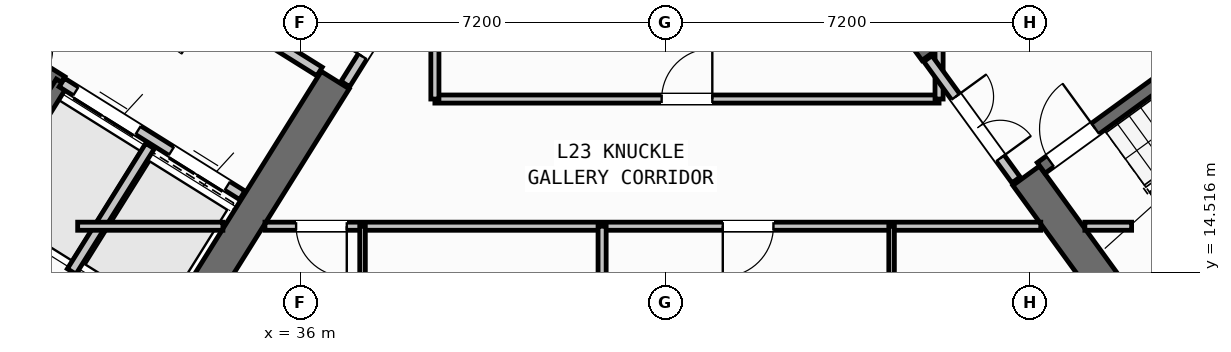
"""IFC4 building model, lengths in metres.
Left out: names, types, materials, properties, quantities, classifications, styles, units other than length and angle.
Written with IfcOpenShell. Run it as: python <this file> out.ifc"""

import sys

from ifc_helpers import new_model, si_unit, direction, frame, frame_2d, origin, place, context, subcontext, project, spatial, rectangle, extrude, source, transform, mapped, element, fill, save


model = new_model("IFC4")
c1 = context("Model", 3, precision=1e-05, world=origin(), true_north=direction((0.0, 1.0)))
c2 = subcontext(c1, "Body", "Model", "MODEL_VIEW")
j1 = project(units=[si_unit("LENGTHUNIT", "METRE"), si_unit("PLANEANGLEUNIT", "RADIAN")], contexts=[c1])
p1 = place(None, origin())
s1 = spatial("IfcSite", under=j1, at=p1, CompositionType="ELEMENT")
p2 = place(p1, origin())
s2 = spatial("IfcBuilding", under=s1, at=p2, CompositionType="ELEMENT")
p3 = place(p2, frame((0.0, 0.0, 93.6)))
s3 = spatial("IfcBuildingStorey", under=s2, at=p3, CompositionType="ELEMENT", Elevation=93.6)
p4 = place(p3, frame((33.409, 12.45, 0.0), z_axis=(0.0, 0.0, 1.0), x_axis=(-0.848051132073, 0.529914405721, 0.0)))
e1 = element("IfcWall", 1, at=p4, inside=s3, PredefinedType="SHEAR", context=c2, shape_type="SweptSolid", body=[
    extrude(rectangle(XDim=13.24, YDim=0.65, at=frame_2d((6.62, 0.0))), origin(), (0.0, 0.0, 1.0), 3.35),
])
p5 = place(p3, frame((36.683, 18.304, 0.0), z_axis=(0.0, 0.0, 1.0), x_axis=(-0.529899109053, -0.848060690178, 0.0)))
e2 = element("IfcWall", 2, at=p5, inside=s3, PredefinedType="SHEAR", context=c2, shape_type="SweptSolid", body=[
    extrude(rectangle(XDim=6.375, YDim=0.65, at=frame_2d((3.188, 0.0))), origin(), (0.0, 0.0, 1.0), 3.35),
])
p6 = place(p3, frame((52.318, 13.11, 0.0), z_axis=(0.0, 0.0, 1.0), x_axis=(0.809019445368, 0.587781878776, 0.0)))
e3 = element("IfcWall", 3, at=p6, inside=s3, PredefinedType="SHEAR", context=c2, shape_type="SweptSolid", body=[
    extrude(rectangle(XDim=12.44, YDim=0.65, at=frame_2d((6.22, 0.0))), origin(), (0.0, 0.0, 1.0), 3.35),
])
p7 = place(p3, frame((52.39, 13.564, 0.0), z_axis=(0.0, 0.0, 1.0), x_axis=(-0.58779688989, 0.809008539037, 0.0)))
e4 = element("IfcWall", 4, at=p7, inside=s3, PredefinedType="SHEAR", context=c2, shape_type="SweptSolid", body=[
    extrude(rectangle(XDim=3.525, YDim=0.65, at=frame_2d((1.763, 0.0))), origin(), (0.0, 0.0, 1.0), 3.35),
])
p8 = place(p3, frame((48.526, 18.884, 0.0), z_axis=(0.0, 0.0, 1.0), x_axis=(-0.58777996584, 0.809020835181, 0.0)))
e5 = element("IfcWall", 5, at=p8, inside=s3, PredefinedType="SHEAR", context=c2, shape_type="SweptSolid", body=[
    extrude(rectangle(XDim=6.375, YDim=0.65, at=frame_2d((3.188, 0.0))), origin(), (0.0, 0.0, 1.0), 3.35),
])
p9 = place(p3, frame((31.76, 12.183, 0.0), z_axis=(0.0, 0.0, 1.0), x_axis=(-0.848047074256, 0.529920899612, 0.0)))
e6 = element("IfcWall", 6, at=p9, inside=s3, PredefinedType="STANDARD", context=c2, shape_type="SweptSolid", body=[
    extrude(rectangle(XDim=30.652, YDim=0.32, at=frame_2d((15.326, 0.0))), origin(), (0.0, 0.0, 1.0), 3.35),
])
p10 = place(p9, frame((15.153, 0.0, 0.0)))
e7 = element("IfcOpeningElement", 7, at=p10, cuts=e6, PredefinedType="OPENING", context=c2, shape_type="SweptSolid", body=[
    extrude(rectangle(XDim=1.2, YDim=2.15, at=frame_2d((0.6, 1.075))), frame((0.0, 0.17, 0.0), z_axis=(0.0, -1.0, 0.0), x_axis=(1.0, 0.0, 0.0)), (0.0, 0.0, 1.0), 0.34),
])
p11 = place(p9, frame((2.002, 0.0, 0.8)))
e8 = element("IfcOpeningElement", 8, at=p11, cuts=e6, PredefinedType="OPENING", context=c2, shape_type="SweptSolid", body=[
    extrude(rectangle(XDim=2.1, YDim=1.55, at=frame_2d((1.05, 0.775))), frame((0.0, 0.17, 0.0), z_axis=(0.0, -1.0, 0.0), x_axis=(1.0, 0.0, 0.0)), (0.0, 0.0, 1.0), 0.34),
])
p12 = place(p9, frame((7.206, 0.0, 0.8)))
e9 = element("IfcOpeningElement", 9, at=p12, cuts=e6, PredefinedType="OPENING", context=c2, shape_type="SweptSolid", body=[
    extrude(rectangle(XDim=2.1, YDim=1.55, at=frame_2d((1.05, 0.775))), frame((0.0, 0.17, 0.0), z_axis=(0.0, -1.0, 0.0), x_axis=(1.0, 0.0, 0.0)), (0.0, 0.0, 1.0), 0.34),
])
p13 = place(p9, frame((12.648, 0.0, 1.0)))
e10 = element("IfcOpeningElement", 10, at=p13, cuts=e6, PredefinedType="OPENING", context=c2, shape_type="SweptSolid", body=[
    extrude(rectangle(XDim=0.9, YDim=1.25, at=frame_2d((0.45, 0.625))), frame((0.0, 0.17, 0.0), z_axis=(0.0, -1.0, 0.0), x_axis=(1.0, 0.0, 0.0)), (0.0, 0.0, 1.0), 0.34),
])
p14 = place(p9, frame((27.974, 0.0, 0.95)))
e11 = element("IfcOpeningElement", 11, at=p14, cuts=e6, PredefinedType="OPENING", context=c2, shape_type="SweptSolid", body=[
    extrude(rectangle(XDim=1.2, YDim=1.4, at=frame_2d((0.6, 0.7))), frame((0.0, 0.17, 0.0), z_axis=(0.0, -1.0, 0.0), x_axis=(1.0, 0.0, 0.0)), (0.0, 0.0, 1.0), 0.34),
])
p15 = place(p9, frame((18.347, 0.0, 1.0)))
e12 = element("IfcOpeningElement", 12, at=p15, cuts=e6, PredefinedType="OPENING", context=c2, shape_type="SweptSolid", body=[
    extrude(rectangle(XDim=0.9, YDim=1.25, at=frame_2d((0.45, 0.625))), frame((0.0, 0.17, 0.0), z_axis=(0.0, -1.0, 0.0), x_axis=(1.0, 0.0, 0.0)), (0.0, 0.0, 1.0), 0.34),
])
p16 = place(p9, frame((20.931, 0.0, 1.0)))
e13 = element("IfcOpeningElement", 13, at=p16, cuts=e6, PredefinedType="OPENING", context=c2, shape_type="SweptSolid", body=[
    extrude(rectangle(XDim=0.65, YDim=1.15, at=frame_2d((0.325, 0.575))), frame((0.0, 0.17, 0.0), z_axis=(0.0, -1.0, 0.0), x_axis=(1.0, 0.0, 0.0)), (0.0, 0.0, 1.0), 0.34),
])
p17 = place(p9, frame((22.938, 0.0, 1.0)))
e14 = element("IfcOpeningElement", 14, at=p17, cuts=e6, PredefinedType="OPENING", context=c2, shape_type="SweptSolid", body=[
    extrude(rectangle(XDim=0.9, YDim=1.25, at=frame_2d((0.45, 0.625))), frame((0.0, 0.17, 0.0), z_axis=(0.0, -1.0, 0.0), x_axis=(1.0, 0.0, 0.0)), (0.0, 0.0, 1.0), 0.34),
])
p18 = place(p9, frame((25.069, 0.0, 1.0)))
e15 = element("IfcOpeningElement", 15, at=p18, cuts=e6, PredefinedType="OPENING", context=c2, shape_type="SweptSolid", body=[
    extrude(rectangle(XDim=0.9, YDim=1.25, at=frame_2d((0.45, 0.625))), frame((0.0, 0.17, 0.0), z_axis=(0.0, -1.0, 0.0), x_axis=(1.0, 0.0, 0.0)), (0.0, 0.0, 1.0), 0.34),
])
p19 = place(p3, frame((31.28, 18.261, 0.0), z_axis=(0.0, 0.0, 1.0), x_axis=(-0.848051618787, 0.529913626805, 0.0)))
e16 = element("IfcWall", 16, at=p19, inside=s3, PredefinedType="SHEAR", context=c2, shape_type="SweptSolid", body=[
    extrude(rectangle(XDim=7.46, YDim=0.26, at=frame_2d((3.73, 0.0))), origin(), (0.0, 0.0, 1.0), 3.35),
])
p20 = place(p19, frame((0.36, 0.0, 0.0)))
e17 = element("IfcOpeningElement", 17, at=p20, cuts=e16, PredefinedType="OPENING", context=c2, shape_type="SweptSolid", body=[
    extrude(rectangle(XDim=0.86, YDim=2.05, at=frame_2d((0.43, 1.025))), frame((0.0, 0.14, 0.0), z_axis=(0.0, -1.0, 0.0), x_axis=(1.0, 0.0, 0.0)), (0.0, 0.0, 1.0), 0.28),
])
p21 = place(p3, frame((31.288, 18.256, 0.0), z_axis=(0.0, 0.0, 1.0), x_axis=(-0.529943379326, -0.848033026897, 0.0)))
e18 = element("IfcWall", 18, at=p21, inside=s3, PredefinedType="SHEAR", context=c2, shape_type="SweptSolid", body=[
    extrude(rectangle(XDim=3.16, YDim=0.26, at=frame_2d((1.58, 0.0))), origin(), (0.0, 0.0, 1.0), 3.35),
])
p22 = place(p3, frame((34.848, 16.031, 0.0), z_axis=(0.0, 0.0, 1.0), x_axis=(-0.848044042236, 0.529925751807, 0.0)))
e19 = element("IfcWall", 19, at=p22, inside=s3, PredefinedType="STANDARD", context=c2, shape_type="SweptSolid", body=[
    extrude(rectangle(XDim=4.198, YDim=0.2, at=frame_2d((2.099, 0.0))), origin(), (0.0, 0.0, 1.0), 3.34),
])
p23 = place(p22, frame((0.348, 0.0, 0.0)))
e20 = element("IfcOpeningElement", 20, at=p23, cuts=e19, PredefinedType="OPENING", context=c2, shape_type="SweptSolid", body=[
    extrude(rectangle(XDim=1.3, YDim=2.2, at=frame_2d((0.65, 1.1))), frame((0.0, 0.11, 0.0), z_axis=(0.0, -1.0, 0.0), x_axis=(1.0, 0.0, 0.0)), (0.0, 0.0, 1.0), 0.22),
])
p24 = place(p22, frame((2.423, 0.0, 0.0)))
e21 = element("IfcOpeningElement", 21, at=p24, cuts=e19, PredefinedType="OPENING", context=c2, shape_type="SweptSolid", body=[
    extrude(rectangle(XDim=1.45, YDim=2.25, at=frame_2d((0.725, 1.125))), frame((0.0, 0.11, 0.0), z_axis=(0.0, -1.0, 0.0), x_axis=(1.0, 0.0, 0.0)), (0.0, 0.0, 1.0), 0.22),
])
p25 = place(p3, frame((36.374, 18.474, 0.0), z_axis=(0.0, 0.0, 1.0), x_axis=(-0.848051071577, 0.529914502535, 0.0)))
e22 = element("IfcWall", 22, at=p25, inside=s3, PredefinedType="STANDARD", context=c2, shape_type="SweptSolid", body=[
    extrude(rectangle(XDim=5.718, YDim=0.2, at=frame_2d((2.859, 0.0))), origin(), (0.0, 0.0, 1.0), 3.34),
])
p26 = place(p25, frame((2.498, 0.0, 0.0)))
e23 = element("IfcOpeningElement", 23, at=p26, cuts=e22, PredefinedType="OPENING", context=c2, shape_type="SweptSolid", body=[
    extrude(rectangle(XDim=1.15, YDim=2.1, at=frame_2d((0.575, 1.05))), frame((0.0, 0.11, 0.0), z_axis=(0.0, -1.0, 0.0), x_axis=(1.0, 0.0, 0.0)), (0.0, 0.0, 1.0), 0.22),
])
p27 = place(p3, frame((33.029, 17.003, 0.0), z_axis=(0.0, 0.0, 1.0), x_axis=(-0.529916267533, -0.848049968695, 0.0)))
e24 = element("IfcWall", 24, at=p27, inside=s3, PredefinedType="STANDARD", context=c2, shape_type="SweptSolid", body=[
    extrude(rectangle(XDim=2.92, YDim=0.2, at=frame_2d((1.46, 0.0))), origin(), (0.0, 0.0, 1.0), 3.34),
])
p28 = place(p3, frame((52.472, 14.013, 0.0), z_axis=(0.0, 0.0, 1.0), x_axis=(0.809028366311, 0.587769599847, 0.0)))
e25 = element("IfcWall", 25, at=p28, inside=s3, PredefinedType="SHEAR", context=c2, shape_type="SweptSolid", body=[
    extrude(rectangle(XDim=7.33, YDim=0.26, at=frame_2d((3.665, 0.0))), origin(), (0.0, 0.0, 1.0), 3.35),
])
p29 = place(p3, frame((50.615, 16.57, 0.0), z_axis=(0.0, 0.0, 1.0), x_axis=(0.809028366311, 0.587769599847, 0.0)))
e26 = element("IfcWall", 26, at=p29, inside=s3, PredefinedType="SHEAR", context=c2, shape_type="SweptSolid", body=[
    extrude(rectangle(XDim=7.33, YDim=0.26, at=frame_2d((3.665, 0.0))), origin(), (0.0, 0.0, 1.0), 3.35),
])
p30 = place(p29, frame((0.22, 0.0, 0.0)))
e27 = element("IfcOpeningElement", 27, at=p30, cuts=e26, PredefinedType="OPENING", context=c2, shape_type="SweptSolid", body=[
    extrude(rectangle(XDim=1.1, YDim=2.1, at=frame_2d((0.55, 1.05))), frame((0.0, 0.14, 0.0), z_axis=(0.0, -1.0, 0.0), x_axis=(1.0, 0.0, 0.0)), (0.0, 0.0, 1.0), 0.28),
])
p31 = place(p3, frame((38.451, 20.737, 0.0), z_axis=(0.0, 0.0, 1.0), x_axis=(-0.529924799939, -0.848044637038, 0.0)))
e28 = element("IfcWall", 28, at=p31, inside=s3, PredefinedType="STANDARD", context=c2, shape_type="SweptSolid", body=[
    extrude(rectangle(XDim=2.96, YDim=0.2, at=frame_2d((1.48, 0.0))), origin(), (0.0, 0.0, 1.0), 3.34),
])
p32 = place(p31, frame((1.46, 0.0, 0.0)))
e29 = element("IfcOpeningElement", 29, at=p32, cuts=e28, PredefinedType="OPENING", context=c2, shape_type="SweptSolid", body=[
    extrude(rectangle(XDim=0.86, YDim=2.05, at=frame_2d((0.43, 1.025))), frame((0.0, 0.11, 0.0), z_axis=(0.0, -1.0, 0.0), x_axis=(1.0, 0.0, 0.0)), (0.0, 0.0, 1.0), 0.22),
])
p33 = place(p3, frame((31.6, 15.42, 0.0), z_axis=(0.0, 0.0, 1.0), x_axis=(1.0, 0.0, 0.0)))
e30 = element("IfcWall", 30, at=p33, inside=s3, PredefinedType="PARTITIONING", context=c2, shape_type="SweptSolid", body=[
    extrude(rectangle(XDim=2.866, YDim=0.16, at=frame_2d((1.433, 0.0))), origin(), (0.0, 0.0, 1.0), 3.34),
])
p34 = place(p3, frame((35.296, 15.42, 0.0), z_axis=(0.0, 0.0, 1.0), x_axis=(1.0, 0.0, 0.0)))
e31 = element("IfcWall", 31, at=p34, inside=s3, PredefinedType="PARTITIONING", context=c2, shape_type="SweptSolid", body=[
    extrude(rectangle(XDim=15.311, YDim=0.16, at=frame_2d((7.655, 0.0))), origin(), (0.0, 0.0, 1.0), 3.34),
])
p35 = place(p34, frame((0.615, 0.0, 0.0)))
e32 = element("IfcOpeningElement", 32, at=p35, cuts=e31, PredefinedType="OPENING", context=c2, shape_type="SweptSolid", body=[
    extrude(rectangle(XDim=1.0, YDim=2.1, at=frame_2d((0.5, 1.05))), frame((0.0, 0.09, 0.0), z_axis=(0.0, -1.0, 0.0), x_axis=(1.0, 0.0, 0.0)), (0.0, 0.0, 1.0), 0.18),
])
p36 = place(p34, frame((9.035, 0.0, 0.0)))
e33 = element("IfcOpeningElement", 33, at=p36, cuts=e31, PredefinedType="OPENING", context=c2, shape_type="SweptSolid", body=[
    extrude(rectangle(XDim=1.0, YDim=2.1, at=frame_2d((0.5, 1.05))), frame((0.0, 0.09, 0.0), z_axis=(0.0, -1.0, 0.0), x_axis=(1.0, 0.0, 0.0)), (0.0, 0.0, 1.0), 0.18),
])
p37 = place(p3, frame((51.477, 15.42, 0.0), z_axis=(0.0, 0.0, 1.0), x_axis=(1.0, 0.0, 0.0)))
e34 = element("IfcWall", 34, at=p37, inside=s3, PredefinedType="PARTITIONING", context=c2, shape_type="SweptSolid", body=[
    extrude(rectangle(XDim=0.923, YDim=0.16, at=frame_2d((0.461, 0.0))), origin(), (0.0, 0.0, 1.0), 3.34),
])
p38 = place(p3, frame((38.65, 17.93, 0.0), z_axis=(0.0, 0.0, 1.0), x_axis=(1.0, 0.0, 0.0)))
e35 = element("IfcWall", 35, at=p38, inside=s3, PredefinedType="PARTITIONING", context=c2, shape_type="SweptSolid", body=[
    extrude(rectangle(XDim=9.95, YDim=0.16, at=frame_2d((4.975, 0.0))), origin(), (0.0, 0.0, 1.0), 3.34),
])
p39 = place(p38, frame((4.475, 0.0, 0.0)))
e36 = element("IfcOpeningElement", 36, at=p39, cuts=e35, PredefinedType="OPENING", context=c2, shape_type="SweptSolid", body=[
    extrude(rectangle(XDim=1.0, YDim=2.1, at=frame_2d((0.5, 1.05))), frame((0.0, 0.09, 0.0), z_axis=(0.0, -1.0, 0.0), x_axis=(1.0, 0.0, 0.0)), (0.0, 0.0, 1.0), 0.18),
])
p40 = place(p3, frame((38.65, 17.93, 0.0), z_axis=(0.0, 0.0, 1.0), x_axis=(0.0, 1.0, 0.0)))
e37 = element("IfcWall", 37, at=p40, inside=s3, PredefinedType="PARTITIONING", context=c2, shape_type="SweptSolid", body=[
    extrude(rectangle(XDim=2.857, YDim=0.16, at=frame_2d((1.428, 0.0))), origin(), (0.0, 0.0, 1.0), 3.34),
])
p41 = place(p3, frame((48.6, 17.93, 0.0), z_axis=(0.0, 0.0, 1.0), x_axis=(0.0, 1.0, 0.0)))
e38 = element("IfcWall", 38, at=p41, inside=s3, PredefinedType="PARTITIONING", context=c2, shape_type="SweptSolid", body=[
    extrude(rectangle(XDim=0.993, YDim=0.16, at=frame_2d((0.496, 0.0))), origin(), (0.0, 0.0, 1.0), 3.34),
])
p42 = place(p3, frame((50.119, 16.333, 0.0), z_axis=(0.0, 0.0, 1.0), x_axis=(-0.587749856981, 0.809042709391, 0.0)))
e39 = element("IfcWall", 39, at=p42, inside=s3, PredefinedType="STANDARD", context=c2, shape_type="SweptSolid", body=[
    extrude(rectangle(XDim=2.96, YDim=0.2, at=frame_2d((1.48, 0.0))), origin(), (0.0, 0.0, 1.0), 3.34),
])
p43 = place(p42, frame((0.53, 0.0, 0.0)))
e40 = element("IfcOpeningElement", 40, at=p43, cuts=e39, PredefinedType="OPENING", context=c2, shape_type="SweptSolid", body=[
    extrude(rectangle(XDim=1.5, YDim=2.15, at=frame_2d((0.75, 1.075))), frame((0.0, 0.11, 0.0), z_axis=(0.0, -1.0, 0.0), x_axis=(1.0, 0.0, 0.0)), (0.0, 0.0, 1.0), 0.22),
])
p44 = place(p3, frame((41.95, 1.96, 0.0), z_axis=(0.0, 0.0, 1.0), x_axis=(0.0, 1.0, 0.0)))
e41 = element("IfcWall", 41, at=p44, inside=s3, PredefinedType="PARTITIONING", context=c2, shape_type="SweptSolid", body=[
    extrude(rectangle(XDim=13.46, YDim=0.16, at=frame_2d((6.73, 0.0))), origin(), (0.0, 0.0, 1.0), 3.34),
])
p45 = place(p3, frame((37.222, 1.96, 0.0), z_axis=(0.0, 0.0, 1.0), x_axis=(0.0, 1.0, 0.0)))
e42 = element("IfcWall", 42, at=p45, inside=s3, PredefinedType="PARTITIONING", context=c2, shape_type="SweptSolid", body=[
    extrude(rectangle(XDim=13.46, YDim=0.11, at=frame_2d((6.73, 0.0))), origin(), (0.0, 0.0, 1.0), 3.34),
])
p46 = place(p45, frame((5.2, 0.0, 0.0)))
e43 = element("IfcOpeningElement", 43, at=p46, cuts=e42, PredefinedType="OPENING", context=c2, shape_type="SweptSolid", body=[
    extrude(rectangle(XDim=0.92, YDim=2.08, at=frame_2d((0.46, 1.04))), frame((0.0, 0.065, 0.0), z_axis=(0.0, -1.0, 0.0), x_axis=(1.0, 0.0, 0.0)), (0.0, 0.0, 1.0), 0.13),
])
p47 = place(p45, frame((10.89, 0.0, 0.0)))
e44 = element("IfcOpeningElement", 44, at=p47, cuts=e42, PredefinedType="OPENING", context=c2, shape_type="SweptSolid", body=[
    extrude(rectangle(XDim=0.88, YDim=2.08, at=frame_2d((0.44, 1.04))), frame((0.0, 0.065, 0.0), z_axis=(0.0, -1.0, 0.0), x_axis=(1.0, 0.0, 0.0)), (0.0, 0.0, 1.0), 0.13),
])
p48 = place(p3, frame((47.663, 1.96, 0.0), z_axis=(0.0, 0.0, 1.0), x_axis=(0.0, 1.0, 0.0)))
e45 = element("IfcWall", 45, at=p48, inside=s3, PredefinedType="PARTITIONING", context=c2, shape_type="SweptSolid", body=[
    extrude(rectangle(XDim=13.46, YDim=0.11, at=frame_2d((6.73, 0.0))), origin(), (0.0, 0.0, 1.0), 3.34),
])
p49 = place(p48, frame((6.3, 0.0, 0.0)))
e46 = element("IfcOpeningElement", 46, at=p49, cuts=e45, PredefinedType="OPENING", context=c2, shape_type="SweptSolid", body=[
    extrude(rectangle(XDim=0.92, YDim=2.08, at=frame_2d((0.46, 1.04))), frame((0.0, 0.065, 0.0), z_axis=(0.0, -1.0, 0.0), x_axis=(1.0, 0.0, 0.0)), (0.0, 0.0, 1.0), 0.13),
])
p50 = place(p48, frame((11.54, 0.0, 0.0)))
e47 = element("IfcOpeningElement", 47, at=p50, cuts=e45, PredefinedType="OPENING", context=c2, shape_type="SweptSolid", body=[
    extrude(rectangle(XDim=0.88, YDim=2.08, at=frame_2d((0.44, 1.04))), frame((0.0, 0.065, 0.0), z_axis=(0.0, -1.0, 0.0), x_axis=(1.0, 0.0, 0.0)), (0.0, 0.0, 1.0), 0.13),
])
m1 = source(origin(), c2, "Body", "SweptSolid", [
    extrude(rectangle(XDim=1.3, YDim=2.2, at=frame_2d((0.65, 1.1))), frame((0.0, 0.025, 0.0), z_axis=(0.0, -1.0, 0.0), x_axis=(1.0, 0.0, 0.0)), (0.0, 0.0, 1.0), 0.05),
])
p51 = place(p23, origin())
e48 = element("IfcDoor", 48, at=p51, inside=s3, OperationType="DOUBLE_DOOR_SLIDING", PredefinedType="DOOR", context=c2, shape_type="MappedRepresentation", body=[
    mapped(m1, transform((0.0, 0.0, 0.0), scale=1.0)),
])
fill(e20, e48)
m2 = source(origin(), c2, "Body", "SweptSolid", [
    extrude(rectangle(XDim=1.45, YDim=2.25, at=frame_2d((0.725, 1.125))), frame((0.0, 0.025, 0.0), z_axis=(0.0, -1.0, 0.0), x_axis=(1.0, 0.0, 0.0)), (0.0, 0.0, 1.0), 0.05),
])
p52 = place(p24, origin())
e49 = element("IfcDoor", 49, at=p52, inside=s3, OperationType="DOUBLE_DOOR_SLIDING", PredefinedType="DOOR", context=c2, shape_type="MappedRepresentation", body=[
    mapped(m2, transform((0.0, 0.0, 0.0), scale=1.0)),
])
fill(e21, e49)
m3 = source(origin(), c2, "Body", "SweptSolid", [
    extrude(rectangle(XDim=1.1, YDim=2.1, at=frame_2d((0.55, 1.05))), frame((0.0, 0.025, 0.0), z_axis=(0.0, -1.0, 0.0), x_axis=(1.0, 0.0, 0.0)), (0.0, 0.0, 1.0), 0.05),
])
p53 = place(p30, origin())
e50 = element("IfcDoor", 50, at=p53, inside=s3, OperationType="SINGLE_SWING_RIGHT", PredefinedType="DOOR", context=c2, shape_type="MappedRepresentation", body=[
    mapped(m3, transform((0.0, 0.0, 0.0), scale=1.0)),
])
fill(e27, e50)
m4 = source(origin(), c2, "Body", "SweptSolid", [
    extrude(rectangle(XDim=1.0, YDim=2.1, at=frame_2d((0.5, 1.05))), frame((0.0, 0.025, 0.0), z_axis=(0.0, -1.0, 0.0), x_axis=(1.0, 0.0, 0.0)), (0.0, 0.0, 1.0), 0.05),
])
p54 = place(p39, origin())
e51 = element("IfcDoor", 51, at=p54, inside=s3, OperationType="SINGLE_SWING_RIGHT", PredefinedType="DOOR", context=c2, shape_type="MappedRepresentation", body=[
    mapped(m4, transform((0.0, 0.0, 0.0), scale=1.0)),
])
fill(e36, e51)
m5 = source(origin(), c2, "Body", "SweptSolid", [
    extrude(rectangle(XDim=0.86, YDim=2.05, at=frame_2d((0.43, 1.025))), frame((0.0, 0.025, 0.0), z_axis=(0.0, -1.0, 0.0), x_axis=(1.0, 0.0, 0.0)), (0.0, 0.0, 1.0), 0.05),
])
p55 = place(p32, frame((0.86, 0.0, 0.0), z_axis=(0.0, 0.0, 1.0), x_axis=(-1.0, 0.0, 0.0)))
e52 = element("IfcDoor", 52, at=p55, inside=s3, OperationType="SINGLE_SWING_LEFT", PredefinedType="DOOR", context=c2, shape_type="MappedRepresentation", body=[
    mapped(m5, transform((0.0, 0.0, 0.0), scale=1.0)),
])
fill(e29, e52)
m6 = source(origin(), c2, "Body", "SweptSolid", [
    extrude(rectangle(XDim=1.5, YDim=2.15, at=frame_2d((0.75, 1.075))), frame((0.0, 0.025, 0.0), z_axis=(0.0, -1.0, 0.0), x_axis=(1.0, 0.0, 0.0)), (0.0, 0.0, 1.0), 0.05),
])
p56 = place(p43, frame((1.5, 0.0, 0.0), z_axis=(0.0, 0.0, 1.0), x_axis=(-1.0, 0.0, 0.0)))
e53 = element("IfcDoor", 53, at=p56, inside=s3, OperationType="DOUBLE_DOOR_SINGLE_SWING", PredefinedType="DOOR", context=c2, shape_type="MappedRepresentation", body=[
    mapped(m6, transform((0.0, 0.0, 0.0), scale=1.0)),
])
fill(e40, e53)
p57 = place(p35, frame((1.0, 0.0, 0.0), z_axis=(0.0, 0.0, 1.0), x_axis=(-1.0, 0.0, 0.0)))
e54 = element("IfcDoor", 54, at=p57, inside=s3, OperationType="SINGLE_SWING_LEFT", PredefinedType="DOOR", context=c2, shape_type="MappedRepresentation", body=[
    mapped(m4, transform((0.0, 0.0, 0.0), scale=1.0)),
])
fill(e32, e54)
p58 = place(p36, frame((1.0, 0.0, 0.0), z_axis=(0.0, 0.0, 1.0), x_axis=(-1.0, 0.0, 0.0)))
e55 = element("IfcDoor", 55, at=p58, inside=s3, OperationType="SINGLE_SWING_RIGHT", PredefinedType="DOOR", context=c2, shape_type="MappedRepresentation", body=[
    mapped(m4, transform((0.0, 0.0, 0.0), scale=1.0)),
])
fill(e33, e55)
save(model, sys.argv[1])
